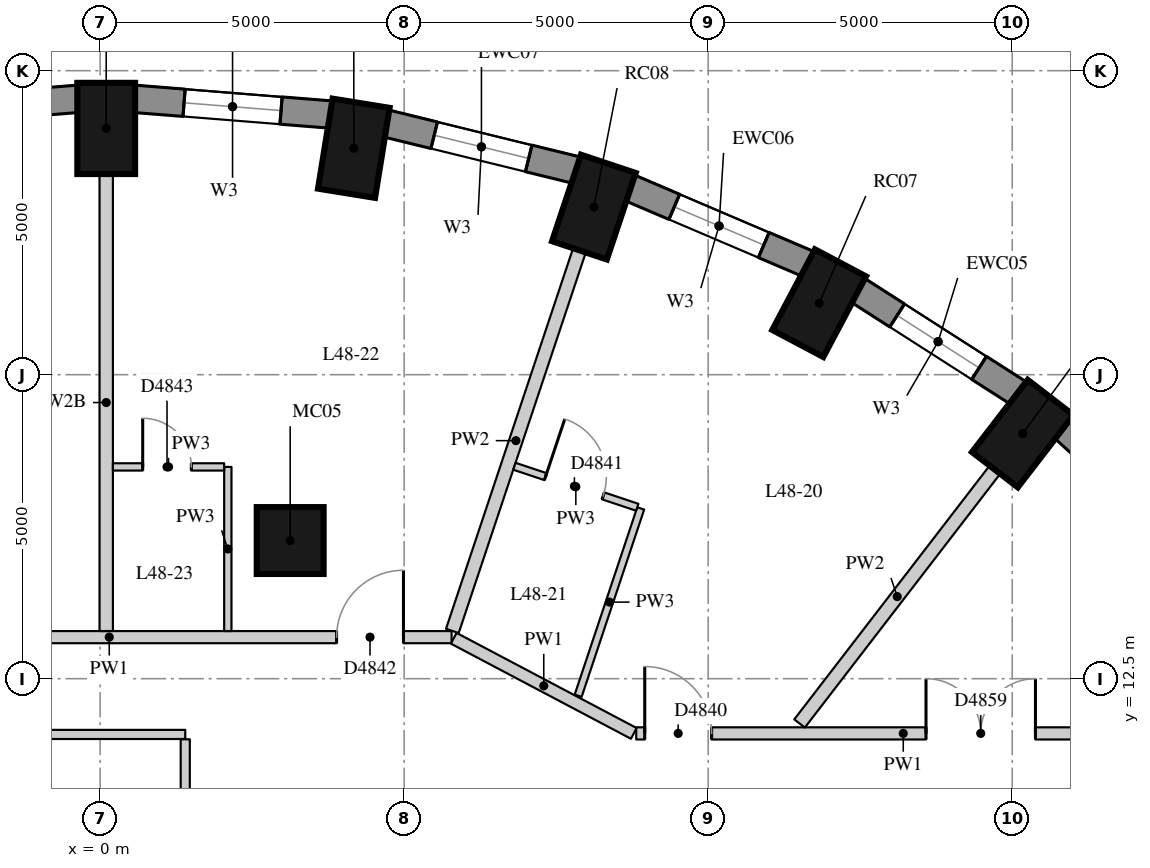
"""IFC4 building model, lengths in metres.
Left out: names, types, materials, properties, quantities, classifications, styles, units other than length and angle.
Written with IfcOpenShell. Run it as: python <this file> out.ifc"""

import sys

from ifc_helpers import new_model, si_unit, direction, frame, frame_2d, origin, origin_2d, place, context, subcontext, project, spatial, rectangle, extrude, element, fill, save


model = new_model("IFC4")
c1 = context("Model", 3, precision=1e-05, world=origin(), true_north=direction((0.0, 1.0)))
c2 = subcontext(c1, "Body", "Model", "MODEL_VIEW")
j1 = project(units=[si_unit("LENGTHUNIT", "METRE"), si_unit("PLANEANGLEUNIT", "RADIAN")], contexts=[c1])
p1 = place(None, origin())
s1 = spatial("IfcSite", under=j1, at=p1, CompositionType="ELEMENT")
p2 = place(p1, origin())
s2 = spatial("IfcBuilding", under=s1, at=p2, CompositionType="ELEMENT")
p3 = place(p2, frame((0.0, 0.0, 171.5)))
s3 = spatial("IfcBuildingStorey", under=s2, at=p3, CompositionType="ELEMENT", Elevation=171.5)
for number, where, z_axis, x_axis in (
    (1, (15.173, 16.532, 0.0), (0.0, 0.0, 1.0), (0.61, 0.792, 0.0)),
    (2, (11.825, 18.676, 0.0), (0.0, 0.0, 1.0), (0.468, 0.884, 0.0)),
    (3, (8.12, 20.256, 0.0), (0.0, 0.0, 1.0), (0.317, 0.949, 0.0)),
    (4, (4.172, 21.224, 0.0), (0.0, 0.0, 1.0), (0.16, 0.987, 0.0)),
    (5, (0.1, 21.55, 0.0), (0.0, 0.0, 1.0), (0.0, 1.0, 0.0)),
):
    element("IfcColumn", number, at=place(p3, frame(where, z_axis=z_axis, x_axis=x_axis)), inside=s3, PredefinedType="COLUMN", context=c2, shape_type="SweptSolid", body=[
        extrude(rectangle(XDim=1.5, YDim=0.95, at=origin_2d()), origin(), (0.0, 0.0, 1.0), 3.3),
    ])
p4 = place(p3, frame((3.126, 14.772, 0.0), z_axis=(0.0, 0.0, 1.0), x_axis=(1.0, 0.0, 0.0)))
e6 = element("IfcColumn", 6, at=p4, inside=s3, PredefinedType="COLUMN", context=c2, shape_type="SweptSolid", body=[
    extrude(rectangle(XDim=1.1, YDim=1.1, at=origin_2d()), origin(), (0.0, 0.0, 1.0), 3.3),
])
p5 = place(p3, frame((18.113, 14.55, 0.0), z_axis=(0.0, 0.0, 1.0), x_axis=(-0.737808755941, 0.675009807082, 0.0)))
e7 = element("IfcWall", 7, at=p5, inside=s3, PredefinedType="SOLIDWALL", context=c2, shape_type="SweptSolid", body=[
    extrude(rectangle(XDim=3.094, YDim=0.45, at=frame_2d((1.547, 0.0))), origin(), (0.0, 0.0, 1.0), 3.02),
])
p6 = place(p3, frame((15.108, 17.193, 0.0), z_axis=(0.0, 0.0, 1.0), x_axis=(-0.842030726237, 0.539429565442, 0.0)))
e8 = element("IfcWall", 8, at=p6, inside=s3, PredefinedType="SOLIDWALL", context=c2, shape_type="SweptSolid", body=[
    extrude(rectangle(XDim=3.151, YDim=0.45, at=frame_2d((1.576, 0.0))), origin(), (0.0, 0.0, 1.0), 3.02),
])
p7 = place(p6, frame((0.776, 0.0, 0.4)))
e9 = element("IfcOpeningElement", 9, at=p7, cuts=e8, PredefinedType="OPENING", context=c2, shape_type="SweptSolid", body=[
    extrude(rectangle(XDim=1.6, YDim=1.75, at=frame_2d((0.8, 0.875))), frame((0.0, 0.235, 0.0), z_axis=(0.0, -1.0, 0.0), x_axis=(1.0, 0.0, 0.0)), (0.0, 0.0, 1.0), 0.47),
])
p8 = place(p3, frame((11.65, 19.319, 0.0), z_axis=(0.0, 0.0, 1.0), x_axis=(-0.91981046949, 0.392362969986, 0.0)))
e10 = element("IfcWall", 10, at=p8, inside=s3, PredefinedType="SOLIDWALL", context=c2, shape_type="SweptSolid", body=[
    extrude(rectangle(XDim=3.201, YDim=0.45, at=frame_2d((1.6, 0.0))), origin(), (0.0, 0.0, 1.0), 3.02),
])
p9 = place(p8, frame((0.8, 0.0, 0.4)))
e11 = element("IfcOpeningElement", 11, at=p9, cuts=e10, PredefinedType="OPENING", context=c2, shape_type="SweptSolid", body=[
    extrude(rectangle(XDim=1.6, YDim=1.75, at=frame_2d((0.8, 0.875))), frame((0.0, 0.235, 0.0), z_axis=(0.0, -1.0, 0.0), x_axis=(1.0, 0.0, 0.0)), (0.0, 0.0, 1.0), 0.47),
])
p10 = place(p3, frame((7.843, 20.862, 0.0), z_axis=(0.0, 0.0, 1.0), x_axis=(-0.971237178372, 0.238114139328, 0.0)))
e12 = element("IfcWall", 12, at=p10, inside=s3, PredefinedType="SOLIDWALL", context=c2, shape_type="SweptSolid", body=[
    extrude(rectangle(XDim=3.237, YDim=0.45, at=frame_2d((1.618, 0.0))), origin(), (0.0, 0.0, 1.0), 3.02),
])
p11 = place(p10, frame((0.818, 0.0, 0.4)))
e13 = element("IfcOpeningElement", 13, at=p11, cuts=e12, PredefinedType="OPENING", context=c2, shape_type="SweptSolid", body=[
    extrude(rectangle(XDim=1.6, YDim=1.75, at=frame_2d((0.8, 0.875))), frame((0.0, 0.235, 0.0), z_axis=(0.0, -1.0, 0.0), x_axis=(1.0, 0.0, 0.0)), (0.0, 0.0, 1.0), 0.47),
])
p12 = place(p3, frame((3.801, 21.778, 0.0), z_axis=(0.0, 0.0, 1.0), x_axis=(-0.996812416891, 0.079780984773, 0.0)))
e14 = element("IfcWall", 14, at=p12, inside=s3, PredefinedType="SOLIDWALL", context=c2, shape_type="SweptSolid", body=[
    extrude(rectangle(XDim=3.256, YDim=0.45, at=frame_2d((1.628, 0.0))), origin(), (0.0, 0.0, 1.0), 3.02),
])
p13 = place(p12, frame((0.828, 0.0, 0.4)))
e15 = element("IfcOpeningElement", 15, at=p13, cuts=e14, PredefinedType="OPENING", context=c2, shape_type="SweptSolid", body=[
    extrude(rectangle(XDim=1.6, YDim=1.75, at=frame_2d((0.8, 0.875))), frame((0.0, 0.235, 0.0), z_axis=(0.0, -1.0, 0.0), x_axis=(1.0, 0.0, 0.0)), (0.0, 0.0, 1.0), 0.47),
])
p14 = place(p3, frame((-0.355, 22.038, 0.0), z_axis=(0.0, 0.0, 1.0), x_axis=(-0.996812416891, -0.079780984773, 0.0)))
e16 = element("IfcWall", 16, at=p14, inside=s3, PredefinedType="SOLIDWALL", context=c2, shape_type="SweptSolid", body=[
    extrude(rectangle(XDim=3.256, YDim=0.45, at=frame_2d((1.628, 0.0))), origin(), (0.0, 0.0, 1.0), 3.02),
])
p15 = place(p14, frame((0.828, 0.0, 0.4)))
e17 = element("IfcOpeningElement", 17, at=p15, cuts=e16, PredefinedType="OPENING", context=c2, shape_type="SweptSolid", body=[
    extrude(rectangle(XDim=1.6, YDim=1.75, at=frame_2d((0.8, 0.875))), frame((0.0, 0.235, 0.0), z_axis=(0.0, -1.0, 0.0), x_axis=(1.0, 0.0, 0.0)), (0.0, 0.0, 1.0), 0.47),
])
p16 = place(p3, frame((-5.48, 13.183, 0.0), z_axis=(0.0, 0.0, 1.0), x_axis=(1.0, 0.0, 0.0)))
e18 = element("IfcWall", 18, at=p16, inside=s3, PredefinedType="PARTITIONING", context=c2, shape_type="SweptSolid", body=[
    extrude(rectangle(XDim=11.26, YDim=0.2, at=frame_2d((5.63, 0.0))), origin(), (0.0, 0.0, 1.0), 3.02),
])
p17 = place(p16, frame((9.368, 0.0, 0.0)))
e19 = element("IfcOpeningElement", 19, at=p17, cuts=e18, PredefinedType="OPENING", context=c2, shape_type="SweptSolid", body=[
    extrude(rectangle(XDim=1.1, YDim=2.1, at=frame_2d((0.55, 1.05))), frame((0.0, 0.11, 0.0), z_axis=(0.0, -1.0, 0.0), x_axis=(1.0, 0.0, 0.0)), (0.0, 0.0, 1.0), 0.22),
])
p18 = place(p16, frame((3.115, 0.0, 0.0)))
e20 = element("IfcOpeningElement", 20, at=p18, cuts=e18, PredefinedType="OPENING", context=c2, shape_type="SweptSolid", body=[
    extrude(rectangle(XDim=1.1, YDim=2.1, at=frame_2d((0.55, 1.05))), frame((0.0, 0.11, 0.0), z_axis=(0.0, -1.0, 0.0), x_axis=(1.0, 0.0, 0.0)), (0.0, 0.0, 1.0), 0.22),
])
p19 = place(p3, frame((5.815, 13.165, 0.0), z_axis=(0.0, 0.0, 1.0), x_axis=(0.884172365794, -0.46716081553, 0.0)))
e21 = element("IfcWall", 21, at=p19, inside=s3, PredefinedType="PARTITIONING", context=c2, shape_type="SweptSolid", body=[
    extrude(rectangle(XDim=3.349, YDim=0.2, at=frame_2d((1.675, 0.0))), origin(), (0.0, 0.0, 1.0), 3.02),
])
p20 = place(p3, frame((8.817, 11.6, 0.0), z_axis=(0.0, 0.0, 1.0), x_axis=(1.0, 0.0, 0.0)))
e22 = element("IfcWall", 22, at=p20, inside=s3, PredefinedType="PARTITIONING", context=c2, shape_type="SweptSolid", body=[
    extrude(rectangle(XDim=8.783, YDim=0.2, at=frame_2d((4.392, 0.0))), origin(), (0.0, 0.0, 1.0), 3.02),
])
p21 = place(p20, frame((0.14, 0.0, 0.0)))
e23 = element("IfcOpeningElement", 23, at=p21, cuts=e22, PredefinedType="OPENING", context=c2, shape_type="SweptSolid", body=[
    extrude(rectangle(XDim=1.1, YDim=2.1, at=frame_2d((0.55, 1.05))), frame((0.0, 0.11, 0.0), z_axis=(0.0, -1.0, 0.0), x_axis=(1.0, 0.0, 0.0)), (0.0, 0.0, 1.0), 0.22),
])
p22 = place(p20, frame((4.766, 0.0, 0.0)))
e24 = element("IfcOpeningElement", 24, at=p22, cuts=e22, PredefinedType="OPENING", context=c2, shape_type="SweptSolid", body=[
    extrude(rectangle(XDim=1.8, YDim=2.1, at=frame_2d((0.9, 1.05))), frame((0.0, 0.11, 0.0), z_axis=(0.0, -1.0, 0.0), x_axis=(1.0, 0.0, 0.0)), (0.0, 0.0, 1.0), 0.22),
])
p23 = place(p3, frame((-4.42, 11.583, 0.0), z_axis=(0.0, 0.0, 1.0), x_axis=(1.0, 0.0, 0.0)))
e25 = element("IfcWall", 25, at=p23, inside=s3, PredefinedType="PARTITIONING", context=c2, shape_type="SweptSolid", body=[
    extrude(rectangle(XDim=5.82, YDim=0.15, at=frame_2d((2.91, 0.0))), origin(), (0.0, 0.0, 1.0), 3.02),
])
p24 = place(p3, frame((1.4, 11.503, 0.0), z_axis=(0.0, 0.0, 1.0), x_axis=(0.0, -1.0, 0.0)))
e26 = element("IfcWall", 26, at=p24, inside=s3, PredefinedType="PARTITIONING", context=c2, shape_type="SweptSolid", body=[
    extrude(rectangle(XDim=2.353, YDim=0.15, at=frame_2d((1.177, 0.0))), origin(), (0.0, 0.0, 1.0), 3.02),
])
p25 = place(p3, frame((14.716, 15.937, 0.0), z_axis=(0.0, 0.0, 1.0), x_axis=(-0.61000193202, -0.792399926131, 0.0)))
e27 = element("IfcWall", 27, at=p25, inside=s3, PredefinedType="PARTITIONING", context=c2, shape_type="SweptSolid", body=[
    extrude(rectangle(XDim=5.267, YDim=0.22, at=frame_2d((2.634, 0.0))), origin(), (0.0, 0.0, 1.0), 3.02),
])
p26 = place(p3, frame((7.883, 19.545, 0.0), z_axis=(0.0, 0.0, 1.0), x_axis=(-0.316704947573, -0.948524104166, 0.0)))
e28 = element("IfcWall", 28, at=p26, inside=s3, PredefinedType="PARTITIONING", context=c2, shape_type="SweptSolid", body=[
    extrude(rectangle(XDim=6.599, YDim=0.22, at=frame_2d((3.3, 0.0))), origin(), (0.0, 0.0, 1.0), 3.02),
])
p27 = place(p3, frame((0.1, 20.8, 0.0), z_axis=(0.0, 0.0, 1.0), x_axis=(0.0, -1.0, 0.0)))
e29 = element("IfcWall", 29, at=p27, inside=s3, PredefinedType="PARTITIONING", context=c2, shape_type="SweptSolid", body=[
    extrude(rectangle(XDim=7.517, YDim=0.22, at=frame_2d((3.758, 0.0))), origin(), (0.0, 0.0, 1.0), 2.57),
])
p28 = place(p3, frame((7.862, 12.219, 0.0), z_axis=(0.0, 0.0, 1.0), x_axis=(0.316678625352, 0.948532892548, 0.0)))
e30 = element("IfcWall", 30, at=p28, inside=s3, PredefinedType="PARTITIONING", context=c2, shape_type="SweptSolid", body=[
    extrude(rectangle(XDim=3.249, YDim=0.12, at=frame_2d((1.625, 0.0))), origin(), (0.0, 0.0, 1.0), 3.02),
])
p29 = place(p3, frame((2.1, 13.283, 0.0), z_axis=(0.0, 0.0, 1.0), x_axis=(0.0, 1.0, 0.0)))
e31 = element("IfcWall", 31, at=p29, inside=s3, PredefinedType="PARTITIONING", context=c2, shape_type="SweptSolid", body=[
    extrude(rectangle(XDim=2.7, YDim=0.12, at=frame_2d((1.35, 0.0))), origin(), (0.0, 0.0, 1.0), 3.02),
])
p30 = place(p3, frame((8.833, 15.32, 0.0), z_axis=(0.0, 0.0, 1.0), x_axis=(-0.948557130447, 0.316606017438, 0.0)))
e32 = element("IfcWall", 32, at=p30, inside=s3, PredefinedType="PARTITIONING", context=c2, shape_type="SweptSolid", body=[
    extrude(rectangle(XDim=2.13, YDim=0.12, at=frame_2d((1.065, 0.0))), origin(), (0.0, 0.0, 1.0), 3.02),
])
p31 = place(p30, frame((0.59, 0.0, 0.0)))
e33 = element("IfcOpeningElement", 33, at=p31, cuts=e32, PredefinedType="OPENING", context=c2, shape_type="SweptSolid", body=[
    extrude(rectangle(XDim=1.0, YDim=2.1, at=frame_2d((0.5, 1.05))), frame((0.0, 0.07, 0.0), z_axis=(0.0, -1.0, 0.0), x_axis=(1.0, 0.0, 0.0)), (0.0, 0.0, 1.0), 0.14),
])
p32 = place(p3, frame((2.04, 15.983, 0.0), z_axis=(0.0, 0.0, 1.0), x_axis=(-1.0, 0.0, 0.0)))
e34 = element("IfcWall", 34, at=p32, inside=s3, PredefinedType="PARTITIONING", context=c2, shape_type="SweptSolid", body=[
    extrude(rectangle(XDim=1.83, YDim=0.12, at=frame_2d((0.915, 0.0))), origin(), (0.0, 0.0, 1.0), 3.02),
])
p33 = place(p32, frame((0.54, 0.0, 0.0)))
e35 = element("IfcOpeningElement", 35, at=p33, cuts=e34, PredefinedType="OPENING", context=c2, shape_type="SweptSolid", body=[
    extrude(rectangle(XDim=0.8, YDim=2.1, at=frame_2d((0.4, 1.05))), frame((0.0, 0.07, 0.0), z_axis=(0.0, -1.0, 0.0), x_axis=(1.0, 0.0, 0.0)), (0.0, 0.0, 1.0), 0.14),
])
p34 = place(p7, origin())
e36 = element("IfcWindow", 36, at=p34, inside=s3, PartitioningType="SINGLE_PANEL", PredefinedType="WINDOW", context=c2, shape_type="SweptSolid", body=[
    extrude(rectangle(XDim=1.6, YDim=1.75, at=frame_2d((0.8, 0.875))), frame((0.0, 0.035, 0.0), z_axis=(0.0, -1.0, 0.0), x_axis=(1.0, 0.0, 0.0)), (0.0, 0.0, 1.0), 0.06),
])
fill(e9, e36)
p35 = place(p9, origin())
e37 = element("IfcWindow", 37, at=p35, inside=s3, PartitioningType="SINGLE_PANEL", PredefinedType="WINDOW", context=c2, shape_type="SweptSolid", body=[
    extrude(rectangle(XDim=1.6, YDim=1.75, at=frame_2d((0.8, 0.875))), frame((0.0, 0.035, 0.0), z_axis=(0.0, -1.0, 0.0), x_axis=(1.0, 0.0, 0.0)), (0.0, 0.0, 1.0), 0.06),
])
fill(e11, e37)
p36 = place(p11, origin())
e38 = element("IfcWindow", 38, at=p36, inside=s3, PartitioningType="SINGLE_PANEL", PredefinedType="WINDOW", context=c2, shape_type="SweptSolid", body=[
    extrude(rectangle(XDim=1.6, YDim=1.75, at=frame_2d((0.8, 0.875))), frame((0.0, 0.035, 0.0), z_axis=(0.0, -1.0, 0.0), x_axis=(1.0, 0.0, 0.0)), (0.0, 0.0, 1.0), 0.06),
])
fill(e13, e38)
p37 = place(p13, origin())
e39 = element("IfcWindow", 39, at=p37, inside=s3, PartitioningType="SINGLE_PANEL", PredefinedType="WINDOW", context=c2, shape_type="SweptSolid", body=[
    extrude(rectangle(XDim=1.6, YDim=1.75, at=frame_2d((0.8, 0.875))), frame((0.0, 0.035, 0.0), z_axis=(0.0, -1.0, 0.0), x_axis=(1.0, 0.0, 0.0)), (0.0, 0.0, 1.0), 0.06),
])
fill(e15, e39)
p38 = place(p21, origin())
e40 = element("IfcDoor", 40, at=p38, inside=s3, OperationType="SINGLE_SWING_LEFT", PredefinedType="DOOR", context=c2, shape_type="SweptSolid", body=[
    extrude(rectangle(XDim=1.1, YDim=2.1, at=frame_2d((0.55, 1.05))), frame((0.0, 0.025, 0.0), z_axis=(0.0, -1.0, 0.0), x_axis=(1.0, 0.0, 0.0)), (0.0, 0.0, 1.0), 0.05),
])
fill(e23, e40)
p39 = place(p31, origin())
e41 = element("IfcDoor", 41, at=p39, inside=s3, OperationType="SINGLE_SWING_LEFT", PredefinedType="DOOR", context=c2, shape_type="SweptSolid", body=[
    extrude(rectangle(XDim=1.0, YDim=2.1, at=frame_2d((0.5, 1.05))), frame((0.0, 0.025, 0.0), z_axis=(0.0, -1.0, 0.0), x_axis=(1.0, 0.0, 0.0)), (0.0, 0.0, 1.0), 0.05),
])
fill(e33, e41)
p40 = place(p17, origin())
e42 = element("IfcDoor", 42, at=p40, inside=s3, OperationType="SINGLE_SWING_RIGHT", PredefinedType="DOOR", context=c2, shape_type="SweptSolid", body=[
    extrude(rectangle(XDim=1.1, YDim=2.1, at=frame_2d((0.55, 1.05))), frame((0.0, 0.025, 0.0), z_axis=(0.0, -1.0, 0.0), x_axis=(1.0, 0.0, 0.0)), (0.0, 0.0, 1.0), 0.05),
])
fill(e19, e42)
p41 = place(p33, origin())
e43 = element("IfcDoor", 43, at=p41, inside=s3, OperationType="SINGLE_SWING_LEFT", PredefinedType="DOOR", context=c2, shape_type="SweptSolid", body=[
    extrude(rectangle(XDim=0.8, YDim=2.1, at=frame_2d((0.4, 1.05))), frame((0.0, 0.025, 0.0), z_axis=(0.0, -1.0, 0.0), x_axis=(1.0, 0.0, 0.0)), (0.0, 0.0, 1.0), 0.05),
])
fill(e35, e43)
p42 = place(p22, origin())
e44 = element("IfcDoor", 44, at=p42, inside=s3, OperationType="DOUBLE_DOOR_SINGLE_SWING", PredefinedType="DOOR", context=c2, shape_type="SweptSolid", body=[
    extrude(rectangle(XDim=1.8, YDim=2.1, at=frame_2d((0.9, 1.05))), frame((0.0, 0.025, 0.0), z_axis=(0.0, -1.0, 0.0), x_axis=(1.0, 0.0, 0.0)), (0.0, 0.0, 1.0), 0.05),
])
fill(e24, e44)
save(model, sys.argv[1])
